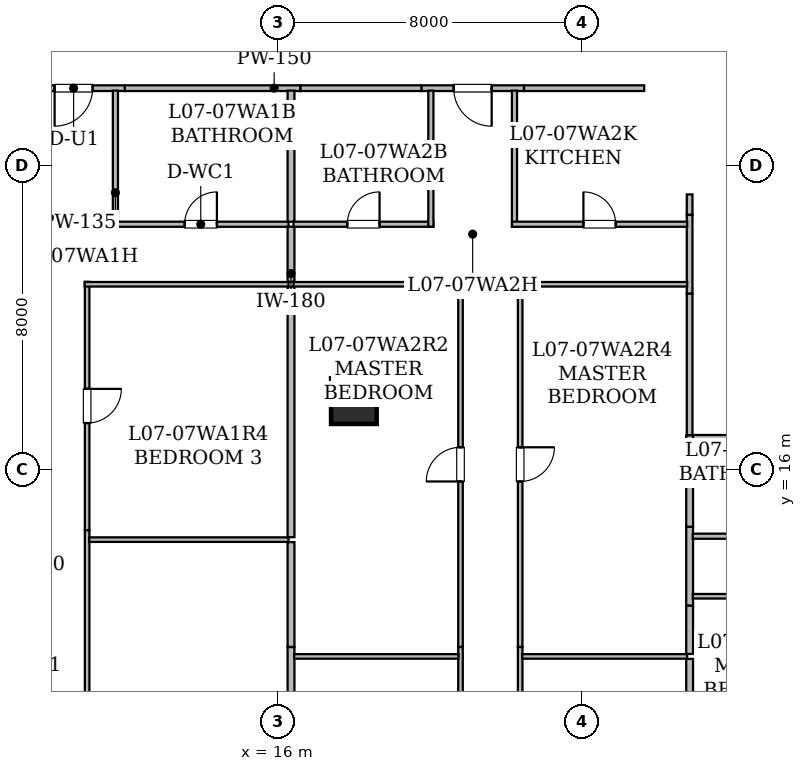
"""IFC4 building model, lengths in metres.
Left out: names, types, materials, properties, quantities, classifications, styles, units other than length and angle.
Written with IfcOpenShell. Run it as: python <this file> out.ifc"""

import sys

from ifc_helpers import new_model, si_unit, direction, frame, frame_2d, origin, origin_2d, place, context, subcontext, project, spatial, rectangle, hollow_rectangle, extrude, element, fill, save


model = new_model("IFC4")
c1 = context("Model", 3, precision=1e-05, world=origin(), true_north=direction((0.0, 1.0)))
c2 = subcontext(c1, "Body", "Model", "MODEL_VIEW")
j1 = project(units=[si_unit("LENGTHUNIT", "METRE"), si_unit("PLANEANGLEUNIT", "RADIAN")], contexts=[c1])
p1 = place(None, origin())
s1 = spatial("IfcSite", under=j1, at=p1, CompositionType="ELEMENT")
p2 = place(p1, origin())
s2 = spatial("IfcBuilding", under=s1, at=p2, CompositionType="ELEMENT")
p3 = place(p2, frame((0.0, 0.0, 33.3)))
s3 = spatial("IfcBuildingStorey", under=s2, at=p3, CompositionType="ELEMENT", Elevation=33.3)
p4 = place(p3, frame((18.0, 17.8, 0.025), z_axis=(0.0, 0.0, 1.0), x_axis=(1.0, 0.0, 0.0)))
e1 = element("IfcColumn", 1, at=p4, inside=s3, PredefinedType="COLUMN", context=c2, shape_type="SweptSolid", body=[
    extrude(hollow_rectangle(XDim=1.2, YDim=1.2, WallThickness=0.06, at=origin_2d()), origin(), (0.0, 0.0, 1.0), 3.625),
])
p5 = place(p3, frame((11.974, 26.035, 0.0), z_axis=(0.0, 0.0, 1.0), x_axis=(-1.0, 0.0, 0.0)))
e2 = element("IfcWall", 2, at=p5, inside=s3, PredefinedType="STANDARD", context=c2, shape_type="SweptSolid", body=[
    extrude(rectangle(XDim=2.698, YDim=0.15, at=frame_2d((1.349, 0.0))), origin(), (0.0, 0.0, 1.0), 3.43),
])
p6 = place(p5, frame((0.849, 0.0, 0.0)))
e3 = element("IfcOpeningElement", 3, at=p6, cuts=e2, PredefinedType="OPENING", context=c2, shape_type="SweptSolid", body=[
    extrude(rectangle(XDim=1.0, YDim=2.15, at=frame_2d((0.5, 1.075))), frame((0.0, 0.085, 0.0), z_axis=(0.0, -1.0, 0.0), x_axis=(1.0, 0.0, 0.0)), (0.0, 0.0, 1.0), 0.17),
])
p7 = place(p3, frame((16.596, 26.035, 0.0), z_axis=(0.0, 0.0, 1.0), x_axis=(-1.0, 0.0, 0.0)))
e4 = element("IfcWall", 4, at=p7, inside=s3, PredefinedType="STANDARD", context=c2, shape_type="SweptSolid", body=[
    extrude(rectangle(XDim=4.622, YDim=0.15, at=frame_2d((2.311, 0.0))), origin(), (0.0, 0.0, 1.0), 3.43),
])
p8 = place(p3, frame((26.835, 20.626, 0.0), z_axis=(0.0, 0.0, 1.0), x_axis=(0.0, 1.0, 0.0)))
e5 = element("IfcWall", 5, at=p8, inside=s3, PredefinedType="STANDARD", context=c2, shape_type="SweptSolid", body=[
    extrude(rectangle(XDim=2.078, YDim=0.15, at=frame_2d((1.039, 0.0))), origin(), (0.0, 0.0, 1.0), 3.43),
])
p9 = place(p3, frame((22.476, 26.035, 0.0), z_axis=(0.0, 0.0, 1.0), x_axis=(-1.0, 0.0, 0.0)))
e6 = element("IfcWall", 6, at=p9, inside=s3, PredefinedType="STANDARD", context=c2, shape_type="SweptSolid", body=[
    extrude(rectangle(XDim=2.699, YDim=0.15, at=frame_2d((1.35, 0.0))), origin(), (0.0, 0.0, 1.0), 3.43),
])
p10 = place(p9, frame((0.85, 0.0, 0.0)))
e7 = element("IfcOpeningElement", 7, at=p10, cuts=e6, PredefinedType="OPENING", context=c2, shape_type="SweptSolid", body=[
    extrude(rectangle(XDim=1.0, YDim=2.15, at=frame_2d((0.5, 1.075))), frame((0.0, 0.085, 0.0), z_axis=(0.0, -1.0, 0.0), x_axis=(1.0, 0.0, 0.0)), (0.0, 0.0, 1.0), 0.17),
])
p11 = place(p3, frame((19.777, 26.035, 0.0), z_axis=(0.0, 0.0, 1.0), x_axis=(-1.0, 0.0, 0.0)))
e8 = element("IfcWall", 8, at=p11, inside=s3, PredefinedType="STANDARD", context=c2, shape_type="SweptSolid", body=[
    extrude(rectangle(XDim=3.181, YDim=0.15, at=frame_2d((1.591, 0.0))), origin(), (0.0, 0.0, 1.0), 2.647),
])
p12 = place(p3, frame((26.835, 22.704, 0.0), z_axis=(0.0, 0.0, 1.0), x_axis=(0.0, 1.0, 0.0)))
e9 = element("IfcWall", 9, at=p12, inside=s3, PredefinedType="STANDARD", context=c2, shape_type="SweptSolid", body=[
    extrude(rectangle(XDim=0.536, YDim=0.15, at=frame_2d((0.268, 0.0))), origin(), (0.0, 0.0, 1.0), 3.43),
])
p13 = place(p3, frame((25.64, 26.035, 0.0), z_axis=(0.0, 0.0, 1.0), x_axis=(-1.0, 0.0, 0.0)))
e10 = element("IfcWall", 10, at=p13, inside=s3, PredefinedType="STANDARD", context=c2, shape_type="SweptSolid", body=[
    extrude(rectangle(XDim=3.164, YDim=0.15, at=frame_2d((1.582, 0.0))), origin(), (0.0, 0.0, 1.0), 3.43),
])
p14 = place(p3, frame((26.835, 16.9, 0.0), z_axis=(0.0, 0.0, 1.0), x_axis=(0.0, 1.0, 0.0)))
e11 = element("IfcWall", 11, at=p14, inside=s3, PredefinedType="STANDARD", context=c2, shape_type="SweptSolid", body=[
    extrude(rectangle(XDim=3.726, YDim=0.15, at=frame_2d((1.863, 0.0))), origin(), (0.0, 0.0, 1.0), 2.647),
])
p15 = place(p3, frame((31.601, 16.835, 0.0), z_axis=(0.0, 0.0, 1.0), x_axis=(-1.0, 0.0, 0.0)))
e12 = element("IfcWall", 12, at=p15, inside=s3, PredefinedType="STANDARD", context=c2, shape_type="SweptSolid", body=[
    extrude(rectangle(XDim=4.701, YDim=0.15, at=frame_2d((2.351, 0.0))), origin(), (0.0, 0.0, 1.0), 2.647),
])
p16 = place(p3, frame((11.725, 25.97, 0.0), z_axis=(0.0, 0.0, 1.0), x_axis=(0.0, -1.0, 0.0)))
e13 = element("IfcWall", 13, at=p16, inside=s3, PredefinedType="PARTITIONING", context=c2, shape_type="SweptSolid", body=[
    extrude(rectangle(XDim=3.58, YDim=0.135, at=frame_2d((1.79, 0.0))), origin(), (0.0, 0.0, 1.0), 2.957),
])
p17 = place(p3, frame((11.66, 22.455, 0.0), z_axis=(0.0, 0.0, 1.0), x_axis=(1.0, 0.0, 0.0)))
e14 = element("IfcWall", 14, at=p17, inside=s3, PredefinedType="PARTITIONING", context=c2, shape_type="SweptSolid", body=[
    extrude(rectangle(XDim=4.621, YDim=0.135, at=frame_2d((2.311, 0.0))), origin(), (0.0, 0.0, 1.0), 3.43),
])
p18 = place(p17, frame((1.886, 0.0, 0.0)))
e15 = element("IfcOpeningElement", 15, at=p18, cuts=e14, PredefinedType="OPENING", context=c2, shape_type="SweptSolid", body=[
    extrude(rectangle(XDim=0.85, YDim=2.1, at=frame_2d((0.425, 1.05))), frame((0.0, 0.077, 0.0), z_axis=(0.0, -1.0, 0.0), x_axis=(1.0, 0.0, 0.0)), (0.0, 0.0, 1.0), 0.155),
])
p19 = place(p3, frame((10.981, 14.405, 0.0), z_axis=(0.0, 0.0, 1.0), x_axis=(0.0, -1.0, 0.0)))
e16 = element("IfcWall", 16, at=p19, inside=s3, PredefinedType="PARTITIONING", context=c2, shape_type="SweptSolid", body=[
    extrude(rectangle(XDim=11.193, YDim=0.12, at=frame_2d((5.597, 0.0))), origin(), (0.0, 0.0, 1.0), 2.647),
])
p20 = place(p19, frame((5.167, 0.0, 0.0)))
e17 = element("IfcOpeningElement", 17, at=p20, cuts=e16, PredefinedType="OPENING", context=c2, shape_type="SweptSolid", body=[
    extrude(rectangle(XDim=0.9, YDim=2.1, at=frame_2d((0.45, 1.05))), frame((0.0, 0.07, 0.0), z_axis=(0.0, -1.0, 0.0), x_axis=(1.0, 0.0, 0.0)), (0.0, 0.0, 1.0), 0.14),
])
p21 = place(p3, frame((10.981, 20.94, 0.0), z_axis=(0.0, 0.0, 1.0), x_axis=(0.0, -1.0, 0.0)))
e18 = element("IfcWall", 18, at=p21, inside=s3, PredefinedType="PARTITIONING", context=c2, shape_type="SweptSolid", body=[
    extrude(rectangle(XDim=6.535, YDim=0.12, at=frame_2d((3.268, 0.0))), origin(), (0.0, 0.0, 1.0), 2.647),
])
p22 = place(p21, frame((2.817, 0.0, 0.0)))
e19 = element("IfcOpeningElement", 19, at=p22, cuts=e18, PredefinedType="OPENING", context=c2, shape_type="SweptSolid", body=[
    extrude(rectangle(XDim=0.9, YDim=2.1, at=frame_2d((0.45, 1.05))), frame((0.0, 0.07, 0.0), z_axis=(0.0, -1.0, 0.0), x_axis=(1.0, 0.0, 0.0)), (0.0, 0.0, 1.0), 0.14),
])
p23 = place(p3, frame((16.281, 20.875, 0.0), z_axis=(0.0, 0.0, 1.0), x_axis=(-1.0, 0.0, 0.0)))
e20 = element("IfcWall", 20, at=p23, inside=s3, PredefinedType="PARTITIONING", context=c2, shape_type="SweptSolid", body=[
    extrude(rectangle(XDim=5.365, YDim=0.12, at=frame_2d((2.683, 0.0))), origin(), (0.0, 0.0, 1.0), 3.43),
])
p24 = place(p3, frame((16.346, 22.39, 0.0), z_axis=(0.0, 0.0, 1.0), x_axis=(0.0, -1.0, 0.0)))
e21 = element("IfcWall", 21, at=p24, inside=s3, PredefinedType="STANDARD", context=c2, shape_type="SweptSolid", body=[
    extrude(rectangle(XDim=1.45, YDim=0.18, at=frame_2d((0.725, 0.0))), origin(), (0.0, 0.0, 1.0), 3.43),
])
p25 = place(p3, frame((16.346, 25.97, 0.0), z_axis=(0.0, 0.0, 1.0), x_axis=(0.0, -1.0, 0.0)))
e22 = element("IfcWall", 22, at=p25, inside=s3, PredefinedType="STANDARD", context=c2, shape_type="SweptSolid", body=[
    extrude(rectangle(XDim=3.45, YDim=0.18, at=frame_2d((1.725, 0.0))), origin(), (0.0, 0.0, 1.0), 2.957),
])
p26 = place(p3, frame((11.035, 14.156, 0.0), z_axis=(0.0, 0.0, 1.0), x_axis=(1.0, 0.0, 0.0)))
e23 = element("IfcWall", 23, at=p26, inside=s3, PredefinedType="PARTITIONING", context=c2, shape_type="SweptSolid", body=[
    extrude(rectangle(XDim=5.246, YDim=0.12, at=frame_2d((2.623, 0.0))), origin(), (0.0, 0.0, 1.0), 2.647),
])
p27 = place(p3, frame((16.346, 11.332, 0.0), z_axis=(0.0, 0.0, 1.0), x_axis=(0.0, -1.0, 0.0)))
e24 = element("IfcWall", 24, at=p27, inside=s3, PredefinedType="STANDARD", context=c2, shape_type="SweptSolid", body=[
    extrude(rectangle(XDim=8.12, YDim=0.18, at=frame_2d((4.06, 0.0))), origin(), (0.0, 0.0, 1.0), 2.803),
])
p28 = place(p3, frame((16.346, 14.091, 0.0), z_axis=(0.0, 0.0, 1.0), x_axis=(0.0, -1.0, 0.0)))
e25 = element("IfcWall", 25, at=p28, inside=s3, PredefinedType="STANDARD", context=c2, shape_type="SweptSolid", body=[
    extrude(rectangle(XDim=2.759, YDim=0.18, at=frame_2d((1.379, 0.0))), origin(), (0.0, 0.0, 1.0), 3.43),
])
p29 = place(p3, frame((16.346, 20.81, 0.0), z_axis=(0.0, 0.0, 1.0), x_axis=(0.0, -1.0, 0.0)))
e26 = element("IfcWall", 26, at=p29, inside=s3, PredefinedType="STANDARD", context=c2, shape_type="SweptSolid", body=[
    extrude(rectangle(XDim=6.589, YDim=0.18, at=frame_2d((3.294, 0.0))), origin(), (0.0, 0.0, 1.0), 2.647),
])
p30 = place(p3, frame((16.411, 22.455, 0.0), z_axis=(0.0, 0.0, 1.0), x_axis=(1.0, 0.0, 0.0)))
e27 = element("IfcWall", 27, at=p30, inside=s3, PredefinedType="PARTITIONING", context=c2, shape_type="SweptSolid", body=[
    extrude(rectangle(XDim=3.68, YDim=0.135, at=frame_2d((1.84, 0.0))), origin(), (0.0, 0.0, 1.0), 2.647),
])
p31 = place(p30, frame((1.415, 0.0, 0.0)))
e28 = element("IfcOpeningElement", 28, at=p31, cuts=e27, PredefinedType="OPENING", context=c2, shape_type="SweptSolid", body=[
    extrude(rectangle(XDim=0.85, YDim=2.1, at=frame_2d((0.425, 1.05))), frame((0.0, 0.077, 0.0), z_axis=(0.0, -1.0, 0.0), x_axis=(1.0, 0.0, 0.0)), (0.0, 0.0, 1.0), 0.155),
])
for number, where, z_axis, x_axis in (
    (29, (20.026, 22.39, 0.0), (0.0, 0.0, 1.0), (0.0, 1.0, 0.0)),
    (30, (22.226, 25.97, 0.0), (0.0, 0.0, 1.0), (0.0, -1.0, 0.0)),
):
    element("IfcWall", number, at=place(p3, frame(where, z_axis=z_axis, x_axis=x_axis)), inside=s3, PredefinedType="PARTITIONING", context=c2, shape_type="SweptSolid", body=[
        extrude(rectangle(XDim=3.58, YDim=0.135, at=frame_2d((1.79, 0.0))), origin(), (0.0, 0.0, 1.0), 3.43),
    ])
p32 = place(p3, frame((22.161, 22.455, 0.0), z_axis=(0.0, 0.0, 1.0), x_axis=(1.0, 0.0, 0.0)))
e31 = element("IfcWall", 31, at=p32, inside=s3, PredefinedType="PARTITIONING", context=c2, shape_type="SweptSolid", body=[
    extrude(rectangle(XDim=4.609, YDim=0.135, at=frame_2d((2.305, 0.0))), origin(), (0.0, 0.0, 1.0), 3.43),
])
p33 = place(p32, frame((1.879, 0.0, 0.0)))
e32 = element("IfcOpeningElement", 32, at=p33, cuts=e31, PredefinedType="OPENING", context=c2, shape_type="SweptSolid", body=[
    extrude(rectangle(XDim=0.85, YDim=2.1, at=frame_2d((0.425, 1.05))), frame((0.0, 0.077, 0.0), z_axis=(0.0, -1.0, 0.0), x_axis=(1.0, 0.0, 0.0)), (0.0, 0.0, 1.0), 0.155),
])
p34 = place(p3, frame((20.806, 3.212, 0.0), z_axis=(0.0, 0.0, 1.0), x_axis=(0.0, 1.0, 0.0)))
e33 = element("IfcWall", 33, at=p34, inside=s3, PredefinedType="PARTITIONING", context=c2, shape_type="SweptSolid", body=[
    extrude(rectangle(XDim=8.12, YDim=0.12, at=frame_2d((4.06, 0.0))), origin(), (0.0, 0.0, 1.0), 2.647),
])
p35 = place(p34, frame((3.589, 0.0, 0.0)))
e34 = element("IfcOpeningElement", 34, at=p35, cuts=e33, PredefinedType="OPENING", context=c2, shape_type="SweptSolid", body=[
    extrude(rectangle(XDim=0.9, YDim=2.1, at=frame_2d((0.45, 1.05))), frame((0.0, 0.07, 0.0), z_axis=(0.0, -1.0, 0.0), x_axis=(1.0, 0.0, 0.0)), (0.0, 0.0, 1.0), 0.14),
])
p36 = place(p3, frame((20.806, 11.332, 0.0), z_axis=(0.0, 0.0, 1.0), x_axis=(0.0, 1.0, 0.0)))
e35 = element("IfcWall", 35, at=p36, inside=s3, PredefinedType="PARTITIONING", context=c2, shape_type="SweptSolid", body=[
    extrude(rectangle(XDim=9.608, YDim=0.12, at=frame_2d((4.804, 0.0))), origin(), (0.0, 0.0, 1.0), 2.647),
])
p37 = place(p36, frame((4.354, 0.0, 0.0)))
e36 = element("IfcOpeningElement", 36, at=p37, cuts=e35, PredefinedType="OPENING", context=c2, shape_type="SweptSolid", body=[
    extrude(rectangle(XDim=0.9, YDim=2.1, at=frame_2d((0.45, 1.05))), frame((0.0, 0.07, 0.0), z_axis=(0.0, -1.0, 0.0), x_axis=(1.0, 0.0, 0.0)), (0.0, 0.0, 1.0), 0.14),
])
p38 = place(p3, frame((20.871, 20.875, 0.0), z_axis=(0.0, 0.0, 1.0), x_axis=(-1.0, 0.0, 0.0)))
e37 = element("IfcWall", 37, at=p38, inside=s3, PredefinedType="PARTITIONING", context=c2, shape_type="SweptSolid", body=[
    extrude(rectangle(XDim=4.46, YDim=0.12, at=frame_2d((2.23, 0.0))), origin(), (0.0, 0.0, 1.0), 2.647),
])
p39 = place(p3, frame((22.376, 11.332, 0.0), z_axis=(0.0, 0.0, 1.0), x_axis=(0.0, -1.0, 0.0)))
e38 = element("IfcWall", 38, at=p39, inside=s3, PredefinedType="PARTITIONING", context=c2, shape_type="SweptSolid", body=[
    extrude(rectangle(XDim=8.12, YDim=0.12, at=frame_2d((4.06, 0.0))), origin(), (0.0, 0.0, 1.0), 2.803),
])
p40 = place(p39, frame((3.631, 0.0, 0.0)))
e39 = element("IfcOpeningElement", 39, at=p40, cuts=e38, PredefinedType="OPENING", context=c2, shape_type="SweptSolid", body=[
    extrude(rectangle(XDim=0.9, YDim=2.1, at=frame_2d((0.45, 1.05))), frame((0.0, 0.07, 0.0), z_axis=(0.0, -1.0, 0.0), x_axis=(1.0, 0.0, 0.0)), (0.0, 0.0, 1.0), 0.14),
])
p41 = place(p3, frame((26.77, 20.875, 0.0), z_axis=(0.0, 0.0, 1.0), x_axis=(-1.0, 0.0, 0.0)))
e40 = element("IfcWall", 40, at=p41, inside=s3, PredefinedType="PARTITIONING", context=c2, shape_type="SweptSolid", body=[
    extrude(rectangle(XDim=4.459, YDim=0.12, at=frame_2d((2.229, 0.0))), origin(), (0.0, 0.0, 1.0), 3.43),
])
p42 = place(p3, frame((22.376, 20.94, 0.0), z_axis=(0.0, 0.0, 1.0), x_axis=(0.0, -1.0, 0.0)))
e41 = element("IfcWall", 41, at=p42, inside=s3, PredefinedType="PARTITIONING", context=c2, shape_type="SweptSolid", body=[
    extrude(rectangle(XDim=9.608, YDim=0.12, at=frame_2d((4.804, 0.0))), origin(), (0.0, 0.0, 1.0), 2.647),
])
p43 = place(p42, frame((4.354, 0.0, 0.0)))
e42 = element("IfcOpeningElement", 42, at=p43, cuts=e41, PredefinedType="OPENING", context=c2, shape_type="SweptSolid", body=[
    extrude(rectangle(XDim=0.9, YDim=2.1, at=frame_2d((0.45, 1.05))), frame((0.0, 0.07, 0.0), z_axis=(0.0, -1.0, 0.0), x_axis=(1.0, 0.0, 0.0)), (0.0, 0.0, 1.0), 0.14),
])
p44 = place(p3, frame((16.428, 11.083, 0.0), z_axis=(0.0, 0.0, 1.0), x_axis=(1.0, 0.0, 0.0)))
e43 = element("IfcWall", 43, at=p44, inside=s3, PredefinedType="PARTITIONING", context=c2, shape_type="SweptSolid", body=[
    extrude(rectangle(XDim=4.324, YDim=0.12, at=frame_2d((2.162, 0.0))), origin(), (0.0, 0.0, 1.0), 2.647),
])
p45 = place(p3, frame((22.43, 11.083, 0.0), z_axis=(0.0, 0.0, 1.0), x_axis=(1.0, 0.0, 0.0)))
e44 = element("IfcWall", 44, at=p45, inside=s3, PredefinedType="PARTITIONING", context=c2, shape_type="SweptSolid", body=[
    extrude(rectangle(XDim=4.34, YDim=0.12, at=frame_2d((2.17, 0.0))), origin(), (0.0, 0.0, 1.0), 3.43),
])
p46 = place(p3, frame((26.835, 11.018, 0.0), z_axis=(0.0, 0.0, 1.0), x_axis=(0.0, -1.0, 0.0)))
e45 = element("IfcWall", 45, at=p46, inside=s3, PredefinedType="STANDARD", context=c2, shape_type="SweptSolid", body=[
    extrude(rectangle(XDim=1.736, YDim=0.18, at=frame_2d((0.868, 0.0))), origin(), (0.0, 0.0, 1.0), 3.43),
])
p47 = place(p3, frame((26.835, 14.495, 0.0), z_axis=(0.0, 0.0, 1.0), x_axis=(0.0, -1.0, 0.0)))
e46 = element("IfcWall", 46, at=p47, inside=s3, PredefinedType="STANDARD", context=c2, shape_type="SweptSolid", body=[
    extrude(rectangle(XDim=2.078, YDim=0.18, at=frame_2d((1.039, 0.0))), origin(), (0.0, 0.0, 1.0), 3.43),
])
p48 = place(p3, frame((26.835, 16.9, 0.0), z_axis=(0.0, 0.0, 1.0), x_axis=(0.0, -1.0, 0.0)))
e47 = element("IfcWall", 47, at=p48, inside=s3, PredefinedType="STANDARD", context=c2, shape_type="SweptSolid", body=[
    extrude(rectangle(XDim=2.405, YDim=0.18, at=frame_2d((1.202, 0.0))), origin(), (0.0, 0.0, 1.0), 3.43),
])
p49 = place(p3, frame((26.835, 12.417, 0.0), z_axis=(0.0, 0.0, 1.0), x_axis=(0.0, -1.0, 0.0)))
e48 = element("IfcWall", 48, at=p49, inside=s3, PredefinedType="STANDARD", context=c2, shape_type="SweptSolid", body=[
    extrude(rectangle(XDim=1.269, YDim=0.18, at=frame_2d((0.635, 0.0))), origin(), (0.0, 0.0, 1.0), 3.43),
])
p50 = place(p3, frame((26.917, 14.246, 0.0), z_axis=(0.0, 0.0, 1.0), x_axis=(1.0, 0.0, 0.0)))
e49 = element("IfcWall", 49, at=p50, inside=s3, PredefinedType="PARTITIONING", context=c2, shape_type="SweptSolid", body=[
    extrude(rectangle(XDim=4.998, YDim=0.135, at=frame_2d((2.499, 0.0))), origin(), (0.0, 0.0, 1.0), 2.647),
])
p51 = place(p50, frame((2.074, 0.0, 0.0)))
e50 = element("IfcOpeningElement", 50, at=p51, cuts=e49, PredefinedType="OPENING", context=c2, shape_type="SweptSolid", body=[
    extrude(rectangle(XDim=0.85, YDim=2.1, at=frame_2d((0.425, 1.05))), frame((0.0, 0.077, 0.0), z_axis=(0.0, -1.0, 0.0), x_axis=(1.0, 0.0, 0.0)), (0.0, 0.0, 1.0), 0.155),
])
p52 = place(p3, frame((33.38, 12.666, 0.0), z_axis=(0.0, 0.0, 1.0), x_axis=(-1.0, 0.0, 0.0)))
e51 = element("IfcWall", 51, at=p52, inside=s3, PredefinedType="PARTITIONING", context=c2, shape_type="SweptSolid", body=[
    extrude(rectangle(XDim=6.463, YDim=0.12, at=frame_2d((3.231, 0.0))), origin(), (0.0, 0.0, 1.0), 2.647),
])
p53 = place(p52, frame((2.781, 0.0, 0.0)))
e52 = element("IfcOpeningElement", 52, at=p53, cuts=e51, PredefinedType="OPENING", context=c2, shape_type="SweptSolid", body=[
    extrude(rectangle(XDim=0.9, YDim=2.1, at=frame_2d((0.45, 1.05))), frame((0.0, 0.07, 0.0), z_axis=(0.0, -1.0, 0.0), x_axis=(1.0, 0.0, 0.0)), (0.0, 0.0, 1.0), 0.14),
])
p54 = place(p6, origin())
e53 = element("IfcDoor", 53, at=p54, inside=s3, OperationType="SINGLE_SWING_RIGHT", PredefinedType="DOOR", context=c2, shape_type="SweptSolid", body=[
    extrude(rectangle(XDim=1.0, YDim=2.15, at=frame_2d((0.5, 1.075))), frame((0.0, 0.025, 0.0), z_axis=(0.0, -1.0, 0.0), x_axis=(1.0, 0.0, 0.0)), (0.0, 0.0, 1.0), 0.05),
])
fill(e3, e53)
p55 = place(p10, origin())
e54 = element("IfcDoor", 54, at=p55, inside=s3, OperationType="SINGLE_SWING_LEFT", PredefinedType="DOOR", context=c2, shape_type="SweptSolid", body=[
    extrude(rectangle(XDim=1.0, YDim=2.15, at=frame_2d((0.5, 1.075))), frame((0.0, 0.025, 0.0), z_axis=(0.0, -1.0, 0.0), x_axis=(1.0, 0.0, 0.0)), (0.0, 0.0, 1.0), 0.05),
])
fill(e7, e54)
p56 = place(p18, origin())
e55 = element("IfcDoor", 55, at=p56, inside=s3, OperationType="SINGLE_SWING_RIGHT", PredefinedType="DOOR", context=c2, shape_type="SweptSolid", body=[
    extrude(rectangle(XDim=0.85, YDim=2.1, at=frame_2d((0.425, 1.05))), frame((0.0, 0.025, 0.0), z_axis=(0.0, -1.0, 0.0), x_axis=(1.0, 0.0, 0.0)), (0.0, 0.0, 1.0), 0.05),
])
fill(e15, e55)
p57 = place(p22, origin())
e56 = element("IfcDoor", 56, at=p57, inside=s3, OperationType="SINGLE_SWING_LEFT", PredefinedType="DOOR", context=c2, shape_type="SweptSolid", body=[
    extrude(rectangle(XDim=0.9, YDim=2.1, at=frame_2d((0.45, 1.05))), frame((0.0, 0.025, 0.0), z_axis=(0.0, -1.0, 0.0), x_axis=(1.0, 0.0, 0.0)), (0.0, 0.0, 1.0), 0.05),
])
fill(e19, e56)
p58 = place(p31, origin())
e57 = element("IfcDoor", 57, at=p58, inside=s3, OperationType="SINGLE_SWING_RIGHT", PredefinedType="DOOR", context=c2, shape_type="SweptSolid", body=[
    extrude(rectangle(XDim=0.85, YDim=2.1, at=frame_2d((0.425, 1.05))), frame((0.0, 0.025, 0.0), z_axis=(0.0, -1.0, 0.0), x_axis=(1.0, 0.0, 0.0)), (0.0, 0.0, 1.0), 0.05),
])
fill(e28, e57)
p59 = place(p33, origin())
e58 = element("IfcDoor", 58, at=p59, inside=s3, OperationType="SINGLE_SWING_LEFT", PredefinedType="DOOR", context=c2, shape_type="SweptSolid", body=[
    extrude(rectangle(XDim=0.85, YDim=2.1, at=frame_2d((0.425, 1.05))), frame((0.0, 0.025, 0.0), z_axis=(0.0, -1.0, 0.0), x_axis=(1.0, 0.0, 0.0)), (0.0, 0.0, 1.0), 0.05),
])
fill(e32, e58)
p60 = place(p37, origin())
e59 = element("IfcDoor", 59, at=p60, inside=s3, OperationType="SINGLE_SWING_LEFT", PredefinedType="DOOR", context=c2, shape_type="SweptSolid", body=[
    extrude(rectangle(XDim=0.9, YDim=2.1, at=frame_2d((0.45, 1.05))), frame((0.0, 0.025, 0.0), z_axis=(0.0, -1.0, 0.0), x_axis=(1.0, 0.0, 0.0)), (0.0, 0.0, 1.0), 0.05),
])
fill(e36, e59)
p61 = place(p43, origin())
e60 = element("IfcDoor", 60, at=p61, inside=s3, OperationType="SINGLE_SWING_LEFT", PredefinedType="DOOR", context=c2, shape_type="SweptSolid", body=[
    extrude(rectangle(XDim=0.9, YDim=2.1, at=frame_2d((0.45, 1.05))), frame((0.0, 0.025, 0.0), z_axis=(0.0, -1.0, 0.0), x_axis=(1.0, 0.0, 0.0)), (0.0, 0.0, 1.0), 0.05),
])
fill(e42, e60)
save(model, sys.argv[1])
